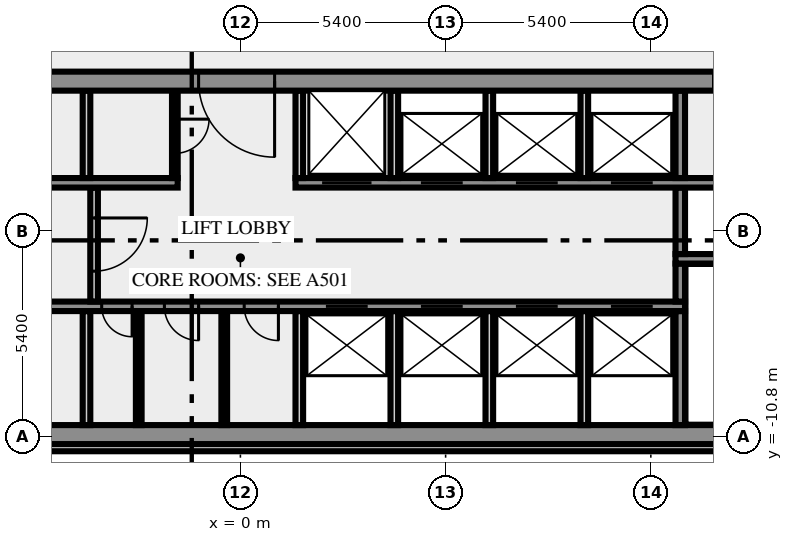
"""IFC4 building model, lengths in metres.
Left out: names, types, materials, properties, quantities, classifications, styles, units other than length and angle.
Written with IfcOpenShell. Run it as: python <this file> out.ifc"""

import sys

from ifc_helpers import new_model, si_unit, direction, frame, frame_2d, origin, place, context, subcontext, project, spatial, rectangle, extrude, element, fill, save


model = new_model("IFC4")
c1 = context("Model", 3, precision=1e-05, world=origin(), true_north=direction((0.0, 1.0)))
c2 = subcontext(c1, "Body", "Model", "MODEL_VIEW")
j1 = project(units=[si_unit("LENGTHUNIT", "METRE"), si_unit("PLANEANGLEUNIT", "RADIAN")], contexts=[c1])
p1 = place(None, origin())
s1 = spatial("IfcSite", under=j1, at=p1, CompositionType="ELEMENT")
p2 = place(p1, origin())
s2 = spatial("IfcBuilding", under=s1, at=p2, CompositionType="ELEMENT")
p3 = place(p2, frame((0.0, 0.0, 234.0)))
s3 = spatial("IfcBuildingStorey", under=s2, at=p3, CompositionType="ELEMENT", Elevation=234.0)
p4 = place(p3, frame((-17.444, -11.088, 0.0), z_axis=(0.0, 0.0, 1.0), x_axis=(1.0, 0.0, 0.0)))
e1 = element("IfcWall", 1, at=p4, inside=s3, PredefinedType="SOLIDWALL", context=c2, shape_type="SweptSolid", body=[
    extrude(rectangle(XDim=34.888, YDim=0.2, at=frame_2d((17.444, 0.0))), origin(), (0.0, 0.0, 1.0), 3.65),
])
p5 = place(p3, frame((-20.0, -10.75, 0.0), z_axis=(0.0, 0.0, 1.0), x_axis=(1.0, 0.0, 0.0)))
e2 = element("IfcWall", 2, at=p5, inside=s3, PredefinedType="SHEAR", context=c2, shape_type="SweptSolid", body=[
    extrude(rectangle(XDim=40.0, YDim=0.5, at=frame_2d((20.0, 0.0))), origin(), (0.0, 0.0, 1.0), 3.65),
])
p6 = place(p5, frame((0.8, 0.0, 1.0)))
e3 = element("IfcOpeningElement", 3, at=p6, cuts=e2, PredefinedType="OPENING", context=c2, shape_type="SweptSolid", body=[
    extrude(rectangle(XDim=1.2, YDim=1.2, at=frame_2d((0.6, 0.6))), frame((0.0, 0.26, 0.0), z_axis=(0.0, -1.0, 0.0), x_axis=(1.0, 0.0, 0.0)), (0.0, 0.0, 1.0), 0.52),
])
p7 = place(p5, frame((38.0, 0.0, 1.0)))
e4 = element("IfcOpeningElement", 4, at=p7, cuts=e2, PredefinedType="OPENING", context=c2, shape_type="SweptSolid", body=[
    extrude(rectangle(XDim=1.2, YDim=1.2, at=frame_2d((0.6, 0.6))), frame((0.0, 0.26, 0.0), z_axis=(0.0, -1.0, 0.0), x_axis=(1.0, 0.0, 0.0)), (0.0, 0.0, 1.0), 0.52),
])
p8 = place(p3, frame((-4.05, -10.5, 0.0), z_axis=(0.0, 0.0, 1.0), x_axis=(0.0, 1.0, 0.0)))
e5 = element("IfcWall", 5, at=p8, inside=s3, PredefinedType="SOLIDWALL", context=c2, shape_type="SweptSolid", body=[
    extrude(rectangle(XDim=3.0, YDim=0.2, at=frame_2d((1.5, 0.0))), origin(), (0.0, 0.0, 1.0), 3.65),
])
for number, where, z_axis, x_axis in (
    (6, (-2.675, -10.5, 0.0), (0.0, 0.0, 1.0), (0.0, 1.0, 0.0)),
    (7, (-0.425, -10.5, 0.0), (0.0, 0.0, 1.0), (0.0, 1.0, 0.0)),
):
    element("IfcWall", number, at=place(p3, frame(where, z_axis=z_axis, x_axis=x_axis)), inside=s3, PredefinedType="PARTITIONING", context=c2, shape_type="SweptSolid", body=[
        extrude(rectangle(XDim=3.0, YDim=0.15, at=frame_2d((1.5, 0.0))), origin(), (0.0, 0.0, 1.0), 3.65),
    ])
for number, where, z_axis, x_axis in (
    (8, (1.55, -10.5, 0.0), (0.0, 0.0, 1.0), (0.0, 1.0, 0.0)),
    (9, (4.05, -10.5, 0.0), (0.0, 0.0, 1.0), (0.0, 1.0, 0.0)),
    (10, (6.55, -10.5, 0.0), (0.0, 0.0, 1.0), (0.0, 1.0, 0.0)),
    (11, (9.05, -10.5, 0.0), (0.0, 0.0, 1.0), (0.0, 1.0, 0.0)),
):
    element("IfcWall", number, at=place(p3, frame(where, z_axis=z_axis, x_axis=x_axis)), inside=s3, PredefinedType="SOLIDWALL", context=c2, shape_type="SweptSolid", body=[
        extrude(rectangle(XDim=3.0, YDim=0.2, at=frame_2d((1.5, 0.0))), origin(), (0.0, 0.0, 1.0), 3.65),
    ])
p9 = place(p3, frame((11.575, -10.5, 0.0), z_axis=(0.0, 0.0, 1.0), x_axis=(0.0, 1.0, 0.0)))
e12 = element("IfcWall", 12, at=p9, inside=s3, PredefinedType="SHEAR", context=c2, shape_type="SweptSolid", body=[
    extrude(rectangle(XDim=3.0, YDim=0.25, at=frame_2d((1.5, 0.0))), origin(), (0.0, 0.0, 1.0), 3.65),
])
p10 = place(p3, frame((11.7, -7.375, 0.0), z_axis=(0.0, 0.0, 1.0), x_axis=(-1.0, 0.0, 0.0)))
e13 = element("IfcWall", 13, at=p10, inside=s3, PredefinedType="SHEAR", context=c2, shape_type="SweptSolid", body=[
    extrude(rectangle(XDim=23.4, YDim=0.25, at=frame_2d((11.7, 0.0))), origin(), (0.0, 0.0, 1.0), 3.65),
])
p11 = place(p10, frame((19.05, 0.0, 0.0)))
e14 = element("IfcOpeningElement", 14, at=p11, cuts=e13, PredefinedType="OPENING", context=c2, shape_type="SweptSolid", body=[
    extrude(rectangle(XDim=0.9, YDim=2.1, at=frame_2d((0.45, 1.05))), frame((0.0, 0.135, 0.0), z_axis=(0.0, -1.0, 0.0), x_axis=(1.0, 0.0, 0.0)), (0.0, 0.0, 1.0), 0.27),
])
p12 = place(p10, frame((14.55, 0.0, 0.0)))
e15 = element("IfcOpeningElement", 15, at=p12, cuts=e13, PredefinedType="OPENING", context=c2, shape_type="SweptSolid", body=[
    extrude(rectangle(XDim=0.8, YDim=2.1, at=frame_2d((0.4, 1.05))), frame((0.0, 0.135, 0.0), z_axis=(0.0, -1.0, 0.0), x_axis=(1.0, 0.0, 0.0)), (0.0, 0.0, 1.0), 0.27),
])
p13 = place(p10, frame((12.8, 0.0, 0.0)))
e16 = element("IfcOpeningElement", 16, at=p13, cuts=e13, PredefinedType="OPENING", context=c2, shape_type="SweptSolid", body=[
    extrude(rectangle(XDim=0.9, YDim=2.1, at=frame_2d((0.45, 1.05))), frame((0.0, 0.135, 0.0), z_axis=(0.0, -1.0, 0.0), x_axis=(1.0, 0.0, 0.0)), (0.0, 0.0, 1.0), 0.27),
])
p14 = place(p10, frame((10.7, 0.0, 0.0)))
e17 = element("IfcOpeningElement", 17, at=p14, cuts=e13, PredefinedType="OPENING", context=c2, shape_type="SweptSolid", body=[
    extrude(rectangle(XDim=0.9, YDim=2.1, at=frame_2d((0.45, 1.05))), frame((0.0, 0.135, 0.0), z_axis=(0.0, -1.0, 0.0), x_axis=(1.0, 0.0, 0.0)), (0.0, 0.0, 1.0), 0.27),
])
p15 = place(p10, frame((8.35, 0.0, 0.0)))
e18 = element("IfcOpeningElement", 18, at=p15, cuts=e13, PredefinedType="OPENING", context=c2, shape_type="SweptSolid", body=[
    extrude(rectangle(XDim=1.1, YDim=2.1, at=frame_2d((0.55, 1.05))), frame((0.0, 0.135, 0.0), z_axis=(0.0, -1.0, 0.0), x_axis=(1.0, 0.0, 0.0)), (0.0, 0.0, 1.0), 0.27),
])
p16 = place(p10, frame((5.85, 0.0, 0.0)))
e19 = element("IfcOpeningElement", 19, at=p16, cuts=e13, PredefinedType="OPENING", context=c2, shape_type="SweptSolid", body=[
    extrude(rectangle(XDim=1.1, YDim=2.1, at=frame_2d((0.55, 1.05))), frame((0.0, 0.135, 0.0), z_axis=(0.0, -1.0, 0.0), x_axis=(1.0, 0.0, 0.0)), (0.0, 0.0, 1.0), 0.27),
])
p17 = place(p10, frame((3.35, 0.0, 0.0)))
e20 = element("IfcOpeningElement", 20, at=p17, cuts=e13, PredefinedType="OPENING", context=c2, shape_type="SweptSolid", body=[
    extrude(rectangle(XDim=1.1, YDim=2.1, at=frame_2d((0.55, 1.05))), frame((0.0, 0.135, 0.0), z_axis=(0.0, -1.0, 0.0), x_axis=(1.0, 0.0, 0.0)), (0.0, 0.0, 1.0), 0.27),
])
p18 = place(p10, frame((0.85, 0.0, 0.0)))
e21 = element("IfcOpeningElement", 21, at=p18, cuts=e13, PredefinedType="OPENING", context=c2, shape_type="SweptSolid", body=[
    extrude(rectangle(XDim=1.1, YDim=2.1, at=frame_2d((0.55, 1.05))), frame((0.0, 0.135, 0.0), z_axis=(0.0, -1.0, 0.0), x_axis=(1.0, 0.0, 0.0)), (0.0, 0.0, 1.0), 0.27),
])
p19 = place(p3, frame((-3.85, -4.25, 0.0), z_axis=(0.0, 0.0, 1.0), x_axis=(0.0, -1.0, 0.0)))
e22 = element("IfcWall", 22, at=p19, inside=s3, PredefinedType="SOLIDWALL", context=c2, shape_type="SweptSolid", body=[
    extrude(rectangle(XDim=3.0, YDim=0.2, at=frame_2d((1.5, 0.0))), origin(), (0.0, 0.0, 1.0), 3.65),
])
p20 = place(p19, frame((0.8, 0.0, 0.0)))
e23 = element("IfcOpeningElement", 23, at=p20, cuts=e22, PredefinedType="OPENING", context=c2, shape_type="SweptSolid", body=[
    extrude(rectangle(XDim=1.4, YDim=2.1, at=frame_2d((0.7, 1.05))), frame((0.0, 0.11, 0.0), z_axis=(0.0, -1.0, 0.0), x_axis=(1.0, 0.0, 0.0)), (0.0, 0.0, 1.0), 0.22),
])
p21 = place(p3, frame((11.575, -7.25, 0.0), z_axis=(0.0, 0.0, 1.0), x_axis=(0.0, 1.0, 0.0)))
e24 = element("IfcWall", 24, at=p21, inside=s3, PredefinedType="SHEAR", context=c2, shape_type="SweptSolid", body=[
    extrude(rectangle(XDim=1.0, YDim=0.25, at=frame_2d((0.5, 0.0))), origin(), (0.0, 0.0, 1.0), 3.65),
])
p22 = place(p3, frame((19.5, -6.125, 0.0), z_axis=(0.0, 0.0, 1.0), x_axis=(-1.0, 0.0, 0.0)))
e25 = element("IfcWall", 25, at=p22, inside=s3, PredefinedType="SHEAR", context=c2, shape_type="SweptSolid", body=[
    extrude(rectangle(XDim=8.05, YDim=0.25, at=frame_2d((4.025, 0.0))), origin(), (0.0, 0.0, 1.0), 3.65),
])
p23 = place(p22, frame((0.05, 0.0, 0.0)))
e26 = element("IfcOpeningElement", 26, at=p23, cuts=e25, PredefinedType="OPENING", context=c2, shape_type="SweptSolid", body=[
    extrude(rectangle(XDim=1.8, YDim=2.1, at=frame_2d((0.9, 1.05))), frame((0.0, 0.135, 0.0), z_axis=(0.0, -1.0, 0.0), x_axis=(1.0, 0.0, 0.0)), (0.0, 0.0, 1.0), 0.27),
])
p24 = place(p3, frame((11.575, -6.0, 0.0), z_axis=(0.0, 0.0, 1.0), x_axis=(0.0, 1.0, 0.0)))
e27 = element("IfcWall", 27, at=p24, inside=s3, PredefinedType="SHEAR", context=c2, shape_type="SweptSolid", body=[
    extrude(rectangle(XDim=1.75, YDim=0.25, at=frame_2d((0.875, 0.0))), origin(), (0.0, 0.0, 1.0), 3.65),
])
p25 = place(p3, frame((-14.35, -4.125, 0.0), z_axis=(0.0, 0.0, 1.0), x_axis=(1.0, 0.0, 0.0)))
e28 = element("IfcWall", 28, at=p25, inside=s3, PredefinedType="SHEAR", context=c2, shape_type="SweptSolid", body=[
    extrude(rectangle(XDim=12.7, YDim=0.25, at=frame_2d((6.35, 0.0))), origin(), (0.0, 0.0, 1.0), 3.65),
])
p26 = place(p3, frame((1.45, -4.125, 0.0), z_axis=(0.0, 0.0, 1.0), x_axis=(1.0, 0.0, 0.0)))
e29 = element("IfcWall", 29, at=p26, inside=s3, PredefinedType="SHEAR", context=c2, shape_type="SweptSolid", body=[
    extrude(rectangle(XDim=12.9, YDim=0.25, at=frame_2d((6.45, 0.0))), origin(), (0.0, 0.0, 1.0), 3.65),
])
p27 = place(p26, frame((0.7, 0.0, 0.0)))
e30 = element("IfcOpeningElement", 30, at=p27, cuts=e29, PredefinedType="OPENING", context=c2, shape_type="SweptSolid", body=[
    extrude(rectangle(XDim=1.3, YDim=2.1, at=frame_2d((0.65, 1.05))), frame((0.0, 0.135, 0.0), z_axis=(0.0, -1.0, 0.0), x_axis=(1.0, 0.0, 0.0)), (0.0, 0.0, 1.0), 0.27),
])
p28 = place(p26, frame((3.3, 0.0, 0.0)))
e31 = element("IfcOpeningElement", 31, at=p28, cuts=e29, PredefinedType="OPENING", context=c2, shape_type="SweptSolid", body=[
    extrude(rectangle(XDim=1.1, YDim=2.1, at=frame_2d((0.55, 1.05))), frame((0.0, 0.135, 0.0), z_axis=(0.0, -1.0, 0.0), x_axis=(1.0, 0.0, 0.0)), (0.0, 0.0, 1.0), 0.27),
])
p29 = place(p26, frame((5.8, 0.0, 0.0)))
e32 = element("IfcOpeningElement", 32, at=p29, cuts=e29, PredefinedType="OPENING", context=c2, shape_type="SweptSolid", body=[
    extrude(rectangle(XDim=1.1, YDim=2.1, at=frame_2d((0.55, 1.05))), frame((0.0, 0.135, 0.0), z_axis=(0.0, -1.0, 0.0), x_axis=(1.0, 0.0, 0.0)), (0.0, 0.0, 1.0), 0.27),
])
p30 = place(p26, frame((8.3, 0.0, 0.0)))
e33 = element("IfcOpeningElement", 33, at=p30, cuts=e29, PredefinedType="OPENING", context=c2, shape_type="SweptSolid", body=[
    extrude(rectangle(XDim=1.1, YDim=2.1, at=frame_2d((0.55, 1.05))), frame((0.0, 0.135, 0.0), z_axis=(0.0, -1.0, 0.0), x_axis=(1.0, 0.0, 0.0)), (0.0, 0.0, 1.0), 0.27),
])
p31 = place(p3, frame((-4.05, -4.0, 0.0), z_axis=(0.0, 0.0, 1.0), x_axis=(0.0, 1.0, 0.0)))
e34 = element("IfcWall", 34, at=p31, inside=s3, PredefinedType="SOLIDWALL", context=c2, shape_type="SweptSolid", body=[
    extrude(rectangle(XDim=2.3, YDim=0.2, at=frame_2d((1.15, 0.0))), origin(), (0.0, 0.0, 1.0), 3.65),
])
p32 = place(p3, frame((-1.725, -1.7, 0.0), z_axis=(0.0, 0.0, 1.0), x_axis=(0.0, -1.0, 0.0)))
e35 = element("IfcWall", 35, at=p32, inside=s3, PredefinedType="PARTITIONING", context=c2, shape_type="SweptSolid", body=[
    extrude(rectangle(XDim=2.3, YDim=0.15, at=frame_2d((1.15, 0.0))), origin(), (0.0, 0.0, 1.0), 3.65),
])
p33 = place(p32, frame((0.75, 0.0, 0.0)))
e36 = element("IfcOpeningElement", 36, at=p33, cuts=e35, PredefinedType="OPENING", context=c2, shape_type="SweptSolid", body=[
    extrude(rectangle(XDim=0.9, YDim=2.1, at=frame_2d((0.45, 1.05))), frame((0.0, 0.085, 0.0), z_axis=(0.0, -1.0, 0.0), x_axis=(1.0, 0.0, 0.0)), (0.0, 0.0, 1.0), 0.17),
])
for number, where, z_axis, x_axis in (
    (37, (1.55, -4.0, 0.0), (0.0, 0.0, 1.0), (0.0, 1.0, 0.0)),
    (38, (4.05, -4.0, 0.0), (0.0, 0.0, 1.0), (0.0, 1.0, 0.0)),
    (39, (6.55, -4.0, 0.0), (0.0, 0.0, 1.0), (0.0, 1.0, 0.0)),
    (40, (9.05, -4.0, 0.0), (0.0, 0.0, 1.0), (0.0, 1.0, 0.0)),
):
    element("IfcWall", number, at=place(p3, frame(where, z_axis=z_axis, x_axis=x_axis)), inside=s3, PredefinedType="SOLIDWALL", context=c2, shape_type="SweptSolid", body=[
        extrude(rectangle(XDim=2.3, YDim=0.2, at=frame_2d((1.15, 0.0))), origin(), (0.0, 0.0, 1.0), 3.65),
    ])
p34 = place(p3, frame((11.575, -4.0, 0.0), z_axis=(0.0, 0.0, 1.0), x_axis=(0.0, 1.0, 0.0)))
e41 = element("IfcWall", 41, at=p34, inside=s3, PredefinedType="SHEAR", context=c2, shape_type="SweptSolid", body=[
    extrude(rectangle(XDim=2.3, YDim=0.25, at=frame_2d((1.15, 0.0))), origin(), (0.0, 0.0, 1.0), 3.65),
])
p35 = place(p3, frame((20.49, -1.45, 0.0), z_axis=(0.0, 0.0, 1.0), x_axis=(-1.0, 0.0, 0.0)))
e42 = element("IfcWall", 42, at=p35, inside=s3, PredefinedType="SHEAR", context=c2, shape_type="SweptSolid", body=[
    extrude(rectangle(XDim=40.98, YDim=0.5, at=frame_2d((20.49, 0.0))), origin(), (0.0, 0.0, 1.0), 3.65),
])
p36 = place(p35, frame((38.14, 0.0, 0.0)))
e43 = element("IfcOpeningElement", 43, at=p36, cuts=e42, PredefinedType="OPENING", context=c2, shape_type="SweptSolid", body=[
    extrude(rectangle(XDim=1.8, YDim=2.1, at=frame_2d((0.9, 1.05))), frame((0.0, 0.26, 0.0), z_axis=(0.0, -1.0, 0.0), x_axis=(1.0, 0.0, 0.0)), (0.0, 0.0, 1.0), 0.52),
])
p37 = place(p35, frame((36.728, 0.0, 0.0)))
e44 = element("IfcOpeningElement", 44, at=p37, cuts=e42, PredefinedType="OPENING", context=c2, shape_type="SweptSolid", body=[
    extrude(rectangle(XDim=0.8, YDim=2.1, at=frame_2d((0.4, 1.05))), frame((0.0, 0.26, 0.0), z_axis=(0.0, -1.0, 0.0), x_axis=(1.0, 0.0, 0.0)), (0.0, 0.0, 1.0), 0.52),
])
p38 = place(p35, frame((35.153, 0.0, 0.0)))
e45 = element("IfcOpeningElement", 45, at=p38, cuts=e42, PredefinedType="OPENING", context=c2, shape_type="SweptSolid", body=[
    extrude(rectangle(XDim=0.8, YDim=2.1, at=frame_2d((0.4, 1.05))), frame((0.0, 0.26, 0.0), z_axis=(0.0, -1.0, 0.0), x_axis=(1.0, 0.0, 0.0)), (0.0, 0.0, 1.0), 0.52),
])
p39 = place(p35, frame((32.94, 0.0, 0.0)))
e46 = element("IfcOpeningElement", 46, at=p39, cuts=e42, PredefinedType="OPENING", context=c2, shape_type="SweptSolid", body=[
    extrude(rectangle(XDim=0.9, YDim=2.1, at=frame_2d((0.45, 1.05))), frame((0.0, 0.26, 0.0), z_axis=(0.0, -1.0, 0.0), x_axis=(1.0, 0.0, 0.0)), (0.0, 0.0, 1.0), 0.52),
])
p40 = place(p35, frame((29.603, 0.0, 0.0)))
e47 = element("IfcOpeningElement", 47, at=p40, cuts=e42, PredefinedType="OPENING", context=c2, shape_type="SweptSolid", body=[
    extrude(rectangle(XDim=0.9, YDim=2.1, at=frame_2d((0.45, 1.05))), frame((0.0, 0.26, 0.0), z_axis=(0.0, -1.0, 0.0), x_axis=(1.0, 0.0, 0.0)), (0.0, 0.0, 1.0), 0.52),
])
p41 = place(p35, frame((25.877, 0.0, 0.0)))
e48 = element("IfcOpeningElement", 48, at=p41, cuts=e42, PredefinedType="OPENING", context=c2, shape_type="SweptSolid", body=[
    extrude(rectangle(XDim=0.9, YDim=2.1, at=frame_2d((0.45, 1.05))), frame((0.0, 0.26, 0.0), z_axis=(0.0, -1.0, 0.0), x_axis=(1.0, 0.0, 0.0)), (0.0, 0.0, 1.0), 0.52),
])
p42 = place(p35, frame((19.59, 0.0, 0.0)))
e49 = element("IfcOpeningElement", 49, at=p42, cuts=e42, PredefinedType="OPENING", context=c2, shape_type="SweptSolid", body=[
    extrude(rectangle(XDim=2.0, YDim=2.1, at=frame_2d((1.0, 1.05))), frame((0.0, 0.26, 0.0), z_axis=(0.0, -1.0, 0.0), x_axis=(1.0, 0.0, 0.0)), (0.0, 0.0, 1.0), 0.52),
])
p43 = place(p35, frame((7.14, 0.0, 0.0)))
e50 = element("IfcOpeningElement", 50, at=p43, cuts=e42, PredefinedType="OPENING", context=c2, shape_type="SweptSolid", body=[
    extrude(rectangle(XDim=0.9, YDim=2.1, at=frame_2d((0.45, 1.05))), frame((0.0, 0.26, 0.0), z_axis=(0.0, -1.0, 0.0), x_axis=(1.0, 0.0, 0.0)), (0.0, 0.0, 1.0), 0.52),
])
p44 = place(p35, frame((4.19, 0.0, 0.0)))
e51 = element("IfcOpeningElement", 51, at=p44, cuts=e42, PredefinedType="OPENING", context=c2, shape_type="SweptSolid", body=[
    extrude(rectangle(XDim=0.9, YDim=2.1, at=frame_2d((0.45, 1.05))), frame((0.0, 0.26, 0.0), z_axis=(0.0, -1.0, 0.0), x_axis=(1.0, 0.0, 0.0)), (0.0, 0.0, 1.0), 0.52),
])
p45 = place(p35, frame((1.04, 0.0, 0.0)))
e52 = element("IfcOpeningElement", 52, at=p45, cuts=e42, PredefinedType="OPENING", context=c2, shape_type="SweptSolid", body=[
    extrude(rectangle(XDim=1.8, YDim=2.1, at=frame_2d((0.9, 1.05))), frame((0.0, 0.26, 0.0), z_axis=(0.0, -1.0, 0.0), x_axis=(1.0, 0.0, 0.0)), (0.0, 0.0, 1.0), 0.52),
])
p46 = place(p12, origin())
e53 = element("IfcDoor", 53, at=p46, inside=s3, OperationType="SINGLE_SWING_RIGHT", PredefinedType="DOOR", context=c2, shape_type="SweptSolid", body=[
    extrude(rectangle(XDim=0.8, YDim=2.1, at=frame_2d((0.4, 1.05))), frame((0.0, 0.025, 0.0), z_axis=(0.0, -1.0, 0.0), x_axis=(1.0, 0.0, 0.0)), (0.0, 0.0, 1.0), 0.05),
])
fill(e15, e53)
p47 = place(p13, origin())
e54 = element("IfcDoor", 54, at=p47, inside=s3, OperationType="SINGLE_SWING_RIGHT", PredefinedType="DOOR", context=c2, shape_type="SweptSolid", body=[
    extrude(rectangle(XDim=0.9, YDim=2.1, at=frame_2d((0.45, 1.05))), frame((0.0, 0.025, 0.0), z_axis=(0.0, -1.0, 0.0), x_axis=(1.0, 0.0, 0.0)), (0.0, 0.0, 1.0), 0.05),
])
fill(e16, e54)
p48 = place(p14, origin())
e55 = element("IfcDoor", 55, at=p48, inside=s3, OperationType="SINGLE_SWING_LEFT", PredefinedType="DOOR", context=c2, shape_type="SweptSolid", body=[
    extrude(rectangle(XDim=0.9, YDim=2.1, at=frame_2d((0.45, 1.05))), frame((0.0, 0.025, 0.0), z_axis=(0.0, -1.0, 0.0), x_axis=(1.0, 0.0, 0.0)), (0.0, 0.0, 1.0), 0.05),
])
fill(e17, e55)
p49 = place(p15, origin())
e56 = element("IfcDoor", 56, at=p49, inside=s3, OperationType="DOUBLE_DOOR_SLIDING", PredefinedType="DOOR", context=c2, shape_type="SweptSolid", body=[
    extrude(rectangle(XDim=1.1, YDim=2.1, at=frame_2d((0.55, 1.05))), frame((0.0, 0.025, 0.0), z_axis=(0.0, -1.0, 0.0), x_axis=(1.0, 0.0, 0.0)), (0.0, 0.0, 1.0), 0.05),
])
fill(e18, e56)
p50 = place(p16, origin())
e57 = element("IfcDoor", 57, at=p50, inside=s3, OperationType="DOUBLE_DOOR_SLIDING", PredefinedType="DOOR", context=c2, shape_type="SweptSolid", body=[
    extrude(rectangle(XDim=1.1, YDim=2.1, at=frame_2d((0.55, 1.05))), frame((0.0, 0.025, 0.0), z_axis=(0.0, -1.0, 0.0), x_axis=(1.0, 0.0, 0.0)), (0.0, 0.0, 1.0), 0.05),
])
fill(e19, e57)
p51 = place(p17, origin())
e58 = element("IfcDoor", 58, at=p51, inside=s3, OperationType="DOUBLE_DOOR_SLIDING", PredefinedType="DOOR", context=c2, shape_type="SweptSolid", body=[
    extrude(rectangle(XDim=1.1, YDim=2.1, at=frame_2d((0.55, 1.05))), frame((0.0, 0.025, 0.0), z_axis=(0.0, -1.0, 0.0), x_axis=(1.0, 0.0, 0.0)), (0.0, 0.0, 1.0), 0.05),
])
fill(e20, e58)
p52 = place(p18, origin())
e59 = element("IfcDoor", 59, at=p52, inside=s3, OperationType="DOUBLE_DOOR_SLIDING", PredefinedType="DOOR", context=c2, shape_type="SweptSolid", body=[
    extrude(rectangle(XDim=1.1, YDim=2.1, at=frame_2d((0.55, 1.05))), frame((0.0, 0.025, 0.0), z_axis=(0.0, -1.0, 0.0), x_axis=(1.0, 0.0, 0.0)), (0.0, 0.0, 1.0), 0.05),
])
fill(e21, e59)
p53 = place(p20, origin())
e60 = element("IfcDoor", 60, at=p53, inside=s3, OperationType="DOUBLE_DOOR_SINGLE_SWING", PredefinedType="DOOR", context=c2, shape_type="SweptSolid", body=[
    extrude(rectangle(XDim=1.4, YDim=2.1, at=frame_2d((0.7, 1.05))), frame((0.0, 0.025, 0.0), z_axis=(0.0, -1.0, 0.0), x_axis=(1.0, 0.0, 0.0)), (0.0, 0.0, 1.0), 0.05),
])
fill(e23, e60)
p54 = place(p27, origin())
e61 = element("IfcDoor", 61, at=p54, inside=s3, OperationType="DOUBLE_DOOR_SLIDING", PredefinedType="DOOR", context=c2, shape_type="SweptSolid", body=[
    extrude(rectangle(XDim=1.3, YDim=2.1, at=frame_2d((0.65, 1.05))), frame((0.0, 0.025, 0.0), z_axis=(0.0, -1.0, 0.0), x_axis=(1.0, 0.0, 0.0)), (0.0, 0.0, 1.0), 0.05),
])
fill(e30, e61)
p55 = place(p28, origin())
e62 = element("IfcDoor", 62, at=p55, inside=s3, OperationType="DOUBLE_DOOR_SLIDING", PredefinedType="DOOR", context=c2, shape_type="SweptSolid", body=[
    extrude(rectangle(XDim=1.1, YDim=2.1, at=frame_2d((0.55, 1.05))), frame((0.0, 0.025, 0.0), z_axis=(0.0, -1.0, 0.0), x_axis=(1.0, 0.0, 0.0)), (0.0, 0.0, 1.0), 0.05),
])
fill(e31, e62)
p56 = place(p29, origin())
e63 = element("IfcDoor", 63, at=p56, inside=s3, OperationType="DOUBLE_DOOR_SLIDING", PredefinedType="DOOR", context=c2, shape_type="SweptSolid", body=[
    extrude(rectangle(XDim=1.1, YDim=2.1, at=frame_2d((0.55, 1.05))), frame((0.0, 0.025, 0.0), z_axis=(0.0, -1.0, 0.0), x_axis=(1.0, 0.0, 0.0)), (0.0, 0.0, 1.0), 0.05),
])
fill(e32, e63)
p57 = place(p30, origin())
e64 = element("IfcDoor", 64, at=p57, inside=s3, OperationType="DOUBLE_DOOR_SLIDING", PredefinedType="DOOR", context=c2, shape_type="SweptSolid", body=[
    extrude(rectangle(XDim=1.1, YDim=2.1, at=frame_2d((0.55, 1.05))), frame((0.0, 0.025, 0.0), z_axis=(0.0, -1.0, 0.0), x_axis=(1.0, 0.0, 0.0)), (0.0, 0.0, 1.0), 0.05),
])
fill(e33, e64)
p58 = place(p33, origin())
e65 = element("IfcDoor", 65, at=p58, inside=s3, OperationType="SINGLE_SWING_RIGHT", PredefinedType="DOOR", context=c2, shape_type="SweptSolid", body=[
    extrude(rectangle(XDim=0.9, YDim=2.1, at=frame_2d((0.45, 1.05))), frame((0.0, 0.025, 0.0), z_axis=(0.0, -1.0, 0.0), x_axis=(1.0, 0.0, 0.0)), (0.0, 0.0, 1.0), 0.05),
])
fill(e36, e65)
p59 = place(p42, origin())
e66 = element("IfcDoor", 66, at=p59, inside=s3, OperationType="DOUBLE_DOOR_SINGLE_SWING", PredefinedType="DOOR", context=c2, shape_type="SweptSolid", body=[
    extrude(rectangle(XDim=2.0, YDim=2.1, at=frame_2d((1.0, 1.05))), frame((0.0, 0.025, 0.0), z_axis=(0.0, -1.0, 0.0), x_axis=(1.0, 0.0, 0.0)), (0.0, 0.0, 1.0), 0.05),
])
fill(e49, e66)
save(model, sys.argv[1])
